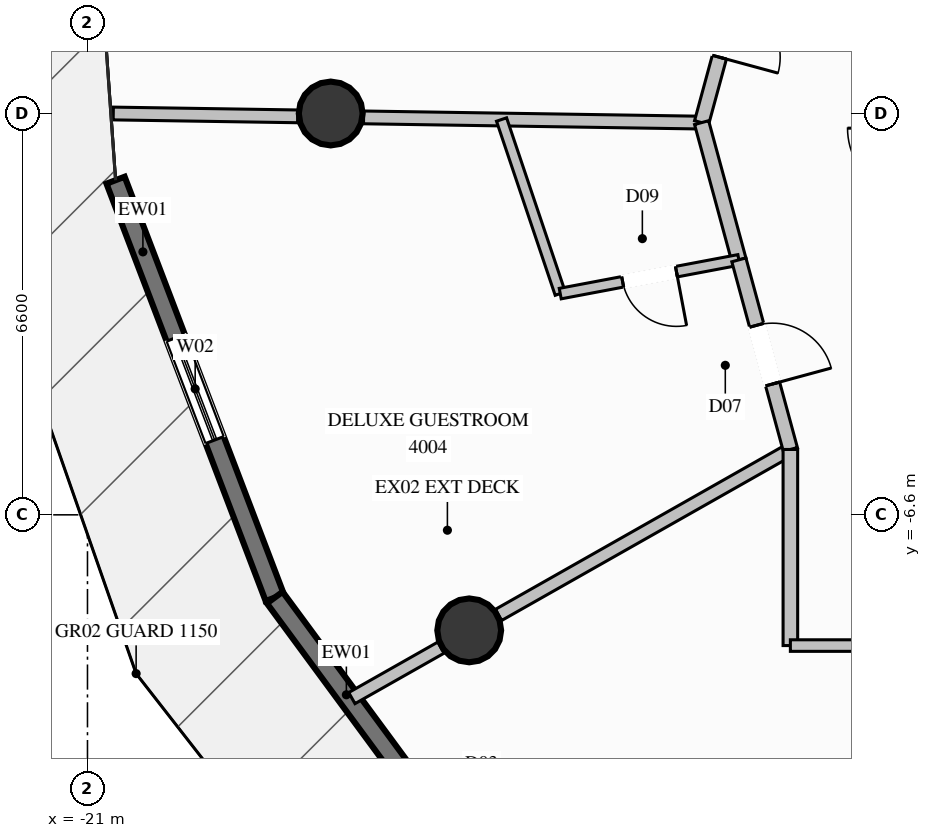
"""IFC4 building model, lengths in metres.
Left out: names, types, materials, properties, quantities, classifications, styles, units other than length and angle.
Written with IfcOpenShell. Run it as: python <this file> out.ifc"""

import sys

from ifc_helpers import new_model, si_unit, direction, frame, frame_2d, origin, origin_2d, place, context, subcontext, project, spatial, rectangle, circle, extrude, element, fill, save


model = new_model("IFC4")
c1 = context("Model", 3, precision=1e-05, world=origin(), true_north=direction((0.0, 1.0)))
c2 = subcontext(c1, "Body", "Model", "MODEL_VIEW")
j1 = project(units=[si_unit("LENGTHUNIT", "METRE"), si_unit("PLANEANGLEUNIT", "RADIAN")], contexts=[c1])
p1 = place(None, origin())
s1 = spatial("IfcSite", under=j1, at=p1, CompositionType="ELEMENT")
p2 = place(p1, origin())
s2 = spatial("IfcBuilding", under=s1, at=p2, CompositionType="ELEMENT")
p3 = place(p2, frame((0.0, 0.0, 149.4)))
s3 = spatial("IfcBuildingStorey", under=s2, at=p3, CompositionType="ELEMENT", Elevation=149.4)
for number, where, z_axis, x_axis in (
    (1, (-17.0, 0.0, 0.0), (0.0, 0.0, 1.0), (1.0, 0.0, 0.0)),
    (2, (-14.722, -8.5, 0.0), (0.0, 0.0, 1.0), (1.0, 0.0, 0.0)),
):
    element("IfcColumn", number, at=place(p3, frame(where, z_axis=z_axis, x_axis=x_axis)), inside=s3, PredefinedType="COLUMN", context=c2, shape_type="SweptSolid", body=[
        extrude(circle(Radius=0.525, at=origin_2d()), origin(), (0.0, 0.0, 1.0), 3.6),
    ])
p4 = place(p3, frame((-17.92, -7.961, 0.0), z_axis=(0.0, 0.0, 1.0), x_axis=(-0.356387771418, 0.93433813814, 0.0)))
e3 = element("IfcWall", 3, at=p4, inside=s3, PredefinedType="SOLIDWALL", context=c2, shape_type="SweptSolid", body=[
    extrude(rectangle(XDim=7.346, YDim=0.32, at=frame_2d((3.673, 0.0))), origin(), (0.0, 0.0, 1.0), 3.35),
])
p5 = place(p4, frame((2.773, 0.0, 0.35)))
e4 = element("IfcOpeningElement", 4, at=p5, cuts=e3, PredefinedType="OPENING", context=c2, shape_type="SweptSolid", body=[
    extrude(rectangle(XDim=1.8, YDim=2.6, at=frame_2d((0.9, 1.3))), frame((0.0, 0.17, 0.0), z_axis=(0.0, -1.0, 0.0), x_axis=(1.0, 0.0, 0.0)), (0.0, 0.0, 1.0), 0.34),
])
p6 = place(p3, frame((-13.436, -14.046, 0.0), z_axis=(0.0, 0.0, 1.0), x_axis=(-0.593218870088, 0.805041223896, 0.0)))
e5 = element("IfcWall", 5, at=p6, inside=s3, PredefinedType="SOLIDWALL", context=c2, shape_type="SweptSolid", body=[
    extrude(rectangle(XDim=7.559, YDim=0.32, at=frame_2d((3.779, 0.0))), origin(), (0.0, 0.0, 1.0), 3.35),
])
p7 = place(p6, frame((2.238, 0.0, 0.0)))
e6 = element("IfcOpeningElement", 6, at=p7, cuts=e5, PredefinedType="OPENING", context=c2, shape_type="SweptSolid", body=[
    extrude(rectangle(XDim=1.1, YDim=2.2, at=frame_2d((0.55, 1.1))), frame((0.0, 0.17, 0.0), z_axis=(0.0, -1.0, 0.0), x_axis=(1.0, 0.0, 0.0)), (0.0, 0.0, 1.0), 0.34),
])
p8 = place(p3, frame((-10.9, -0.15, 0.0), z_axis=(0.0, 0.0, 1.0), x_axis=(-0.999880532043, 0.01545709035, 0.0)))
e7 = element("IfcWall", 7, at=p8, inside=s3, PredefinedType="PARTITIONING", context=c2, shape_type="SweptSolid", body=[
    extrude(rectangle(XDim=5.56, YDim=0.21, at=frame_2d((2.78, 0.0))), origin(), (0.0, 0.0, 1.0), 3.35),
])
p9 = place(p3, frame((-17.543, -0.047, 0.0), z_axis=(0.0, 0.0, 1.0), x_axis=(-0.999879342855, 0.015533825418, 0.0)))
e8 = element("IfcWall", 8, at=p9, inside=s3, PredefinedType="PARTITIONING", context=c2, shape_type="SweptSolid", body=[
    extrude(rectangle(XDim=3.033, YDim=0.21, at=frame_2d((1.517, 0.0))), origin(), (0.0, 0.0, 1.0), 3.35),
])
p10 = place(p3, frame((-9.44, -5.525, 0.0), z_axis=(0.0, 0.0, 1.0), x_axis=(-0.86993170577, -0.493172208561, 0.0)))
e9 = element("IfcWall", 9, at=p10, inside=s3, PredefinedType="PARTITIONING", context=c2, shape_type="SweptSolid", body=[
    extrude(rectangle(XDim=5.518, YDim=0.21, at=frame_2d((2.759, 0.0))), origin(), (0.0, 0.0, 1.0), 2.717),
])
p11 = place(p3, frame((-15.187, -8.784, 0.0), z_axis=(0.0, 0.0, 1.0), x_axis=(-0.870057423981, -0.492950381859, 0.0)))
e10 = element("IfcWall", 10, at=p11, inside=s3, PredefinedType="PARTITIONING", context=c2, shape_type="SweptSolid", body=[
    extrude(rectangle(XDim=1.684, YDim=0.21, at=frame_2d((0.842, 0.0))), origin(), (0.0, 0.0, 1.0), 3.35),
])
p12 = place(p3, frame((-10.053, 2.967, 0.0), z_axis=(0.0, 0.0, 1.0), x_axis=(-0.262209089996, -0.965011084456, 0.0)))
e11 = element("IfcWall", 11, at=p12, inside=s3, PredefinedType="PARTITIONING", context=c2, shape_type="SweptSolid", body=[
    extrude(rectangle(XDim=3.23, YDim=0.24, at=frame_2d((1.615, 0.0))), origin(), (0.0, 0.0, 1.0), 3.35),
])
p13 = place(p12, frame((1.115, 0.0, 0.0)))
e12 = element("IfcOpeningElement", 12, at=p13, cuts=e11, PredefinedType="OPENING", context=c2, shape_type="SweptSolid", body=[
    extrude(rectangle(XDim=1.0, YDim=2.2, at=frame_2d((0.5, 1.1))), frame((0.0, 0.13, 0.0), z_axis=(0.0, -1.0, 0.0), x_axis=(1.0, 0.0, 0.0)), (0.0, 0.0, 1.0), 0.26),
])
p14 = place(p3, frame((-10.9, -0.15, 0.0), z_axis=(0.0, 0.0, 1.0), x_axis=(0.262013132791, -0.965064307829, 0.0)))
e13 = element("IfcWall", 13, at=p14, inside=s3, PredefinedType="PARTITIONING", context=c2, shape_type="SweptSolid", body=[
    extrude(rectangle(XDim=2.339, YDim=0.24, at=frame_2d((1.169, 0.0))), origin(), (0.0, 0.0, 1.0), 3.35),
])
p15 = place(p3, frame((-14.19, -0.099, 0.0), z_axis=(0.0, 0.0, 1.0), x_axis=(0.319377775225, -0.947627477806, 0.0)))
e14 = element("IfcWall", 14, at=p15, inside=s3, PredefinedType="PLUMBINGWALL", context=c2, shape_type="SweptSolid", body=[
    extrude(rectangle(XDim=3.021, YDim=0.175, at=frame_2d((1.51, 0.0))), origin(), (0.0, 0.0, 1.0), 3.35),
])
p16 = place(p3, frame((-10.287, -2.407, 0.0), z_axis=(0.0, 0.0, 1.0), x_axis=(-0.982625425388, -0.185599766653, 0.0)))
e15 = element("IfcWall", 15, at=p16, inside=s3, PredefinedType="PLUMBINGWALL", context=c2, shape_type="SweptSolid", body=[
    extrude(rectangle(XDim=2.99, YDim=0.175, at=frame_2d((1.495, 0.0))), origin(), (0.0, 0.0, 1.0), 3.35),
])
p17 = place(p16, frame((1.045, 0.0, 0.0)))
e16 = element("IfcOpeningElement", 16, at=p17, cuts=e15, PredefinedType="OPENING", context=c2, shape_type="SweptSolid", body=[
    extrude(rectangle(XDim=0.9, YDim=2.1, at=frame_2d((0.45, 1.05))), frame((0.0, 0.098, 0.0), z_axis=(0.0, -1.0, 0.0), x_axis=(1.0, 0.0, 0.0)), (0.0, 0.0, 1.0), 0.195),
])
p18 = place(p3, frame((-10.287, -2.407, 0.0), z_axis=(0.0, 0.0, 1.0), x_axis=(0.262202977539, -0.965012745289, 0.0)))
e17 = element("IfcWall", 17, at=p18, inside=s3, PredefinedType="PARTITIONING", context=c2, shape_type="SweptSolid", body=[
    extrude(rectangle(XDim=3.231, YDim=0.24, at=frame_2d((1.615, 0.0))), origin(), (0.0, 0.0, 1.0), 3.35),
])
p19 = place(p18, frame((1.115, 0.0, 0.0)))
e18 = element("IfcOpeningElement", 18, at=p19, cuts=e17, PredefinedType="OPENING", context=c2, shape_type="SweptSolid", body=[
    extrude(rectangle(XDim=1.0, YDim=2.2, at=frame_2d((0.5, 1.1))), frame((0.0, 0.13, 0.0), z_axis=(0.0, -1.0, 0.0), x_axis=(1.0, 0.0, 0.0)), (0.0, 0.0, 1.0), 0.26),
])
p20 = place(p3, frame((-9.44, -5.525, 0.0), z_axis=(0.0, 0.0, 1.0), x_axis=(0.0, -1.0, 0.0)))
e19 = element("IfcWall", 19, at=p20, inside=s3, PredefinedType="PARTITIONING", context=c2, shape_type="SweptSolid", body=[
    extrude(rectangle(XDim=3.225, YDim=0.24, at=frame_2d((1.613, 0.0))), origin(), (0.0, 0.0, 1.0), 3.35),
])
p21 = place(p3, frame((-9.44, -8.75, 0.0), z_axis=(0.0, 0.0, 1.0), x_axis=(1.0, 0.0, 0.0)))
e20 = element("IfcWall", 20, at=p21, inside=s3, PredefinedType="PARTITIONING", context=c2, shape_type="SweptSolid", body=[
    extrude(rectangle(XDim=9.44, YDim=0.19, at=frame_2d((4.72, 0.0))), origin(), (0.0, 0.0, 1.0), 3.35),
])
p22 = place(p21, frame((4.245, 0.0, 0.0)))
e21 = element("IfcOpeningElement", 21, at=p22, cuts=e20, PredefinedType="OPENING", context=c2, shape_type="SweptSolid", body=[
    extrude(rectangle(XDim=0.95, YDim=2.1, at=frame_2d((0.475, 1.05))), frame((0.0, 0.105, 0.0), z_axis=(0.0, -1.0, 0.0), x_axis=(1.0, 0.0, 0.0)), (0.0, 0.0, 1.0), 0.21),
])
p23 = place(p5, origin())
e22 = element("IfcWindow", 22, at=p23, inside=s3, PartitioningType="SINGLE_PANEL", PredefinedType="WINDOW", context=c2, shape_type="SweptSolid", body=[
    extrude(rectangle(XDim=1.8, YDim=2.6, at=frame_2d((0.9, 1.3))), frame((0.0, 0.03, 0.0), z_axis=(0.0, -1.0, 0.0), x_axis=(1.0, 0.0, 0.0)), (0.0, 0.0, 1.0), 0.06),
])
fill(e4, e22)
p24 = place(p13, origin())
e23 = element("IfcDoor", 23, at=p24, inside=s3, OperationType="SINGLE_SWING_RIGHT", PredefinedType="DOOR", context=c2, shape_type="SweptSolid", body=[
    extrude(rectangle(XDim=1.0, YDim=2.2, at=frame_2d((0.5, 1.1))), frame((0.0, 0.025, 0.0), z_axis=(0.0, -1.0, 0.0), x_axis=(1.0, 0.0, 0.0)), (0.0, 0.0, 1.0), 0.05),
])
fill(e12, e23)
p25 = place(p17, origin())
e24 = element("IfcDoor", 24, at=p25, inside=s3, OperationType="SINGLE_SWING_LEFT", PredefinedType="DOOR", context=c2, shape_type="SweptSolid", body=[
    extrude(rectangle(XDim=0.9, YDim=2.1, at=frame_2d((0.45, 1.05))), frame((0.0, 0.025, 0.0), z_axis=(0.0, -1.0, 0.0), x_axis=(1.0, 0.0, 0.0)), (0.0, 0.0, 1.0), 0.05),
])
fill(e16, e24)
p26 = place(p19, origin())
e25 = element("IfcDoor", 25, at=p26, inside=s3, OperationType="SINGLE_SWING_RIGHT", PredefinedType="DOOR", context=c2, shape_type="SweptSolid", body=[
    extrude(rectangle(XDim=1.0, YDim=2.2, at=frame_2d((0.5, 1.1))), frame((0.0, 0.025, 0.0), z_axis=(0.0, -1.0, 0.0), x_axis=(1.0, 0.0, 0.0)), (0.0, 0.0, 1.0), 0.05),
])
fill(e18, e25)
save(model, sys.argv[1])
